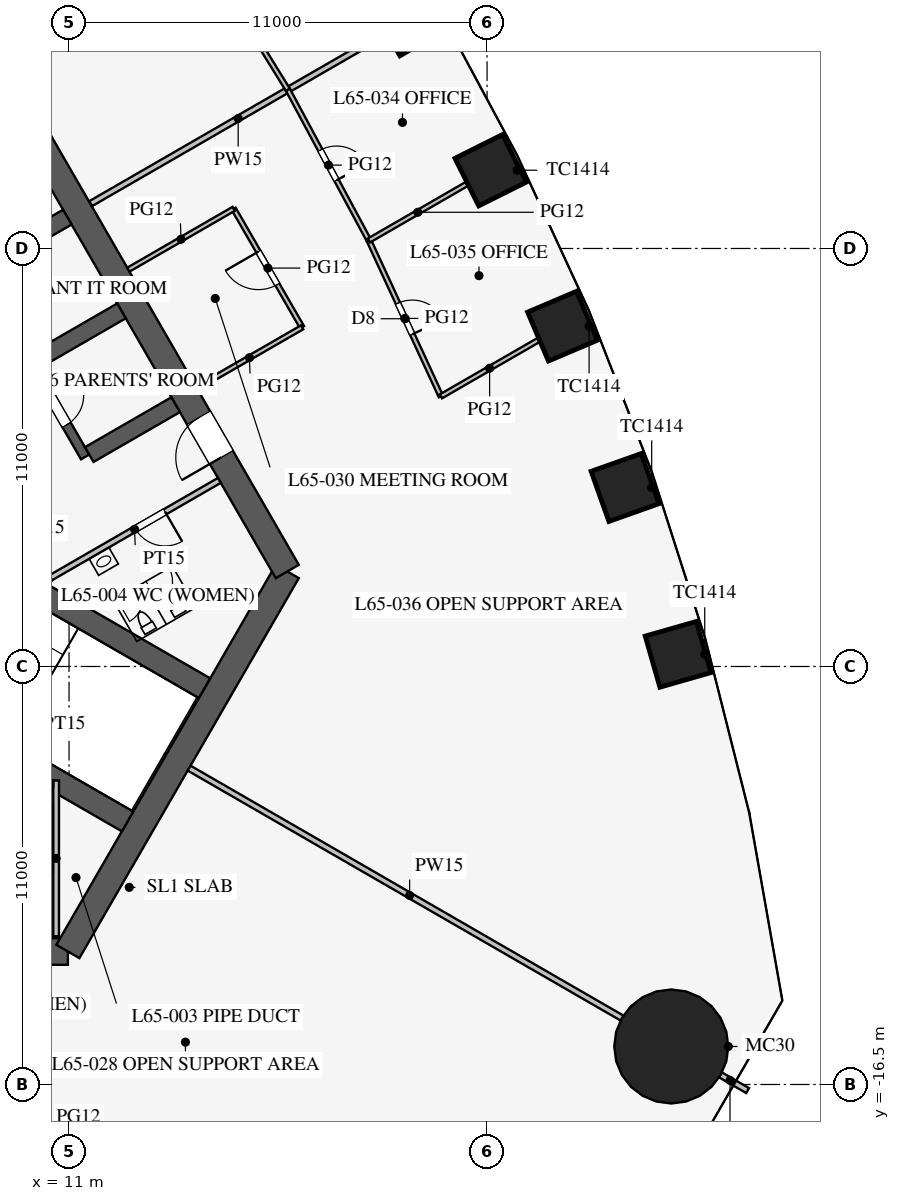
"""IFC4 building model, lengths in metres.
Left out: names, types, materials, properties, quantities, classifications, styles, units other than length and angle.
Written with IfcOpenShell. Run it as: python <this file> out.ifc"""

import sys

from ifc_helpers import new_model, si_unit, direction, frame, frame_2d, origin, origin_2d, place, context, subcontext, project, spatial, rectangle, circle, extrude, element, fill, save


model = new_model("IFC4")
c1 = context("Model", 3, precision=1e-05, world=origin(), true_north=direction((0.0, 1.0)))
c2 = subcontext(c1, "Body", "Model", "MODEL_VIEW")
j1 = project(units=[si_unit("LENGTHUNIT", "METRE"), si_unit("PLANEANGLEUNIT", "RADIAN")], contexts=[c1])
p1 = place(None, origin())
s1 = spatial("IfcSite", under=j1, at=p1, CompositionType="ELEMENT")
p2 = place(p1, origin())
s2 = spatial("IfcBuilding", under=s1, at=p2, CompositionType="ELEMENT")
p3 = place(p2, frame((0.0, 0.0, 284.7)))
s3 = spatial("IfcBuildingStorey", under=s2, at=p3, CompositionType="ELEMENT", Elevation=284.7)
for number, where, z_axis, x_axis in (
    (1, (27.027, -5.18, 0.0), (0.0, 0.0, 1.0), (-0.275, 0.961, 0.0)),
    (2, (25.632, -0.79, 0.0), (0.0, 0.0, 1.0), (-0.334, 0.942, 0.0)),
    (3, (23.985, 3.455, 0.0), (0.0, 0.0, 1.0), (-0.391, 0.92, 0.0)),
    (4, (22.094, 7.56, 0.0), (0.0, 0.0, 1.0), (-0.447, 0.895, 0.0)),
    (5, (19.963, 11.526, 0.0), (0.0, 0.0, 1.0), (-0.5, 0.866, 0.0)),
):
    element("IfcColumn", number, at=place(p3, frame(where, z_axis=z_axis, x_axis=x_axis)), inside=s3, PredefinedType="COLUMN", context=c2, shape_type="SweptSolid", body=[
        extrude(rectangle(XDim=1.4, YDim=1.4, at=origin_2d()), origin(), (0.0, 0.0, 1.0), 4.2),
    ])
p4 = place(p3, frame((26.847, -15.5, 0.0), z_axis=(0.0, 0.0, 1.0), x_axis=(1.0, 0.0, 0.0)))
e6 = element("IfcColumn", 6, at=p4, inside=s3, PredefinedType="COLUMN", context=c2, shape_type="SweptSolid", body=[
    extrude(circle(Radius=1.5, at=origin_2d()), origin(), (0.0, 0.0, 1.0), 4.2),
])
p5 = place(p3, frame((-10.97, -13.0, 0.0), z_axis=(0.0, 0.0, 1.0), x_axis=(1.0, 0.0, 0.0)))
e7 = element("IfcWall", 7, at=p5, inside=s3, PredefinedType="SHEAR", context=c2, shape_type="SweptSolid", body=[
    extrude(rectangle(XDim=21.939, YDim=0.7, at=frame_2d((10.97, 0.0))), origin(), (0.0, 0.0, 1.0), 4.2),
])
p6 = place(p5, frame((17.27, 0.0, 0.0)))
e8 = element("IfcOpeningElement", 8, at=p6, cuts=e7, PredefinedType="OPENING", context=c2, shape_type="SweptSolid", body=[
    extrude(rectangle(XDim=1.2, YDim=2.1, at=frame_2d((0.6, 1.05))), frame((0.0, 0.36, 0.0), z_axis=(0.0, -1.0, 0.0), x_axis=(1.0, 0.0, 0.0)), (0.0, 0.0, 1.0), 0.72),
])
p7 = place(p5, frame((3.47, 0.0, 0.0)))
e9 = element("IfcOpeningElement", 9, at=p7, cuts=e7, PredefinedType="OPENING", context=c2, shape_type="SweptSolid", body=[
    extrude(rectangle(XDim=1.2, YDim=2.1, at=frame_2d((0.6, 1.05))), frame((0.0, 0.36, 0.0), z_axis=(0.0, -1.0, 0.0), x_axis=(1.0, 0.0, 0.0)), (0.0, 0.0, 1.0), 0.72),
])
p8 = place(p3, frame((10.97, -13.0, 0.0), z_axis=(0.0, 0.0, 1.0), x_axis=(0.499995765644, 0.866027848477, 0.0)))
e10 = element("IfcWall", 10, at=p8, inside=s3, PredefinedType="SHEAR", context=c2, shape_type="SweptSolid", body=[
    extrude(rectangle(XDim=11.547, YDim=0.7, at=frame_2d((5.773, 0.0))), origin(), (0.0, 0.0, 1.0), 4.2),
])
p9 = place(p3, frame((16.743, -3.0, 0.0), z_axis=(0.0, 0.0, 1.0), x_axis=(-0.500002442456, 0.866023993627, 0.0)))
e11 = element("IfcWall", 11, at=p9, inside=s3, PredefinedType="SHEAR", context=c2, shape_type="SweptSolid", body=[
    extrude(rectangle(XDim=21.939, YDim=0.7, at=frame_2d((10.97, 0.0))), origin(), (0.0, 0.0, 1.0), 4.2),
])
p10 = place(p9, frame((17.27, 0.0, 0.0)))
e12 = element("IfcOpeningElement", 12, at=p10, cuts=e11, PredefinedType="OPENING", context=c2, shape_type="SweptSolid", body=[
    extrude(rectangle(XDim=1.2, YDim=2.1, at=frame_2d((0.6, 1.05))), frame((0.0, 0.36, 0.0), z_axis=(0.0, -1.0, 0.0), x_axis=(1.0, 0.0, 0.0)), (0.0, 0.0, 1.0), 0.72),
])
p11 = place(p9, frame((3.47, 0.0, 0.0)))
e13 = element("IfcOpeningElement", 13, at=p11, cuts=e11, PredefinedType="OPENING", context=c2, shape_type="SweptSolid", body=[
    extrude(rectangle(XDim=1.2, YDim=2.1, at=frame_2d((0.6, 1.05))), frame((0.0, 0.36, 0.0), z_axis=(0.0, -1.0, 0.0), x_axis=(1.0, 0.0, 0.0)), (0.0, 0.0, 1.0), 0.72),
])
p12 = place(p3, frame((11.424, 0.014, 0.0), z_axis=(0.0, 0.0, 1.0), x_axis=(-0.500001763848, 0.866024385424, 0.0)))
e14 = element("IfcWall", 14, at=p12, inside=s3, PredefinedType="SHEAR", context=c2, shape_type="SweptSolid", body=[
    extrude(rectangle(XDim=11.4, YDim=0.25, at=frame_2d((5.7, 0.0))), origin(), (0.0, 0.0, 1.0), 4.2),
])
p13 = place(p12, frame((0.975, 0.0, 0.0)))
e15 = element("IfcOpeningElement", 15, at=p13, cuts=e14, PredefinedType="OPENING", context=c2, shape_type="SweptSolid", body=[
    extrude(rectangle(XDim=0.9, YDim=2.1, at=frame_2d((0.45, 1.05))), frame((0.0, 0.135, 0.0), z_axis=(0.0, -1.0, 0.0), x_axis=(1.0, 0.0, 0.0)), (0.0, 0.0, 1.0), 0.27),
])
p14 = place(p12, frame((3.825, 0.0, 0.0)))
e16 = element("IfcOpeningElement", 16, at=p14, cuts=e14, PredefinedType="OPENING", context=c2, shape_type="SweptSolid", body=[
    extrude(rectangle(XDim=0.9, YDim=2.1, at=frame_2d((0.45, 1.05))), frame((0.0, 0.135, 0.0), z_axis=(0.0, -1.0, 0.0), x_axis=(1.0, 0.0, 0.0)), (0.0, 0.0, 1.0), 0.27),
])
p15 = place(p12, frame((6.675, 0.0, 0.0)))
e17 = element("IfcOpeningElement", 17, at=p15, cuts=e14, PredefinedType="OPENING", context=c2, shape_type="SweptSolid", body=[
    extrude(rectangle(XDim=0.9, YDim=2.1, at=frame_2d((0.45, 1.05))), frame((0.0, 0.135, 0.0), z_axis=(0.0, -1.0, 0.0), x_axis=(1.0, 0.0, 0.0)), (0.0, 0.0, 1.0), 0.27),
])
p16 = place(p12, frame((9.525, 0.0, 0.0)))
e18 = element("IfcOpeningElement", 18, at=p16, cuts=e14, PredefinedType="OPENING", context=c2, shape_type="SweptSolid", body=[
    extrude(rectangle(XDim=0.9, YDim=2.1, at=frame_2d((0.45, 1.05))), frame((0.0, 0.135, 0.0), z_axis=(0.0, -1.0, 0.0), x_axis=(1.0, 0.0, 0.0)), (0.0, 0.0, 1.0), 0.27),
])
for number, where, z_axis, x_axis in (
    (19, (11.532, 0.076, 0.0), (0.0, 0.0, 1.0), (0.866, 0.5, 0.0)),
    (20, (10.107, 2.544, 0.0), (0.0, 0.0, 1.0), (0.866, 0.5, 0.0)),
    (21, (8.682, 5.012, 0.0), (0.0, 0.0, 1.0), (0.866, 0.5, 0.0)),
):
    element("IfcWall", number, at=place(p3, frame(where, z_axis=z_axis, x_axis=x_axis)), inside=s3, PredefinedType="SHEAR", context=c2, shape_type="SweptSolid", body=[
        extrude(rectangle(XDim=2.625, YDim=0.45, at=frame_2d((1.312, 0.0))), origin(), (0.0, 0.0, 1.0), 4.2),
    ])
for number, where, z_axis, x_axis in (
    (22, (4.638, -5.016, 0.0), (0.0, 0.0, 1.0), (0.866, -0.5, 0.0)),
    (23, (6.663, -1.509, 0.0), (0.0, 0.0, 1.0), (0.866, -0.5, 0.0)),
):
    element("IfcWall", number, at=place(p3, frame(where, z_axis=z_axis, x_axis=x_axis)), inside=s3, PredefinedType="SHEAR", context=c2, shape_type="SweptSolid", body=[
        extrude(rectangle(XDim=9.125, YDim=0.6, at=frame_2d((4.562, 0.0))), origin(), (0.0, 0.0, 1.0), 4.2),
    ])
p17 = place(p3, frame((10.495, -3.178, 0.0), z_axis=(0.0, 0.0, 1.0), x_axis=(0.866037967349, 0.499978238636, 0.0)))
e24 = element("IfcWall", 24, at=p17, inside=s3, PredefinedType="PARTITIONING", context=c2, shape_type="SweptSolid", body=[
    extrude(rectangle(XDim=5.15, YDim=0.15, at=frame_2d((2.575, 0.0))), origin(), (0.0, 0.0, 1.0), 4.0),
])
p18 = place(p17, frame((2.6, 0.0, 0.0)))
e25 = element("IfcOpeningElement", 25, at=p18, cuts=e24, PredefinedType="OPENING", context=c2, shape_type="SweptSolid", body=[
    extrude(rectangle(XDim=0.9, YDim=2.1, at=frame_2d((0.45, 1.05))), frame((0.0, 0.085, 0.0), z_axis=(0.0, -1.0, 0.0), x_axis=(1.0, 0.0, 0.0)), (0.0, 0.0, 1.0), 0.17),
])
p19 = place(p3, frame((10.66, -8.5, 0.0), z_axis=(0.0, 0.0, 1.0), x_axis=(0.0, -1.0, 0.0)))
e26 = element("IfcWall", 26, at=p19, inside=s3, PredefinedType="PARTITIONING", context=c2, shape_type="SweptSolid", body=[
    extrude(rectangle(XDim=4.1, YDim=0.15, at=frame_2d((2.05, 0.0))), origin(), (0.0, 0.0, 1.0), 4.0),
])
p20 = place(p3, frame((8.075, -8.575, 0.0), z_axis=(0.0, 0.0, 1.0), x_axis=(1.0, 0.0, 0.0)))
e27 = element("IfcWall", 27, at=p20, inside=s3, PredefinedType="PARTITIONING", context=c2, shape_type="SweptSolid", body=[
    extrude(rectangle(XDim=2.51, YDim=0.15, at=frame_2d((1.255, 0.0))), origin(), (0.0, 0.0, 1.0), 4.0),
])
p21 = place(p3, frame((14.159, -8.175, 0.0), z_axis=(0.0, 0.0, 1.0), x_axis=(0.866026905467, -0.499997399001, 0.0)))
e28 = element("IfcWall", 28, at=p21, inside=s3, PredefinedType="PARTITIONING", context=c2, shape_type="SweptSolid", body=[
    extrude(rectangle(XDim=13.4, YDim=0.15, at=frame_2d((6.7, 0.0))), origin(), (0.0, 0.0, 1.0), 2.5),
])
p22 = place(p3, frame((27.929, -16.125, 0.0), z_axis=(0.0, 0.0, 1.0), x_axis=(0.866086810508, -0.499893625349, 0.0)))
e29 = element("IfcWall", 29, at=p22, inside=s3, PredefinedType="PARTITIONING", context=c2, shape_type="SweptSolid", body=[
    extrude(rectangle(XDim=1.07, YDim=0.15, at=frame_2d((0.535, 0.0))), origin(), (0.0, 0.0, 1.0), 2.5),
])
p23 = place(p3, frame((11.57, 6.68, 0.0), z_axis=(0.0, 0.0, 1.0), x_axis=(0.866018180823, 0.500012510328, 0.0)))
e30 = element("IfcWall", 30, at=p23, inside=s3, PredefinedType="PARTITIONING", context=c2, shape_type="SweptSolid", body=[
    extrude(rectangle(XDim=8.962, YDim=0.15, at=frame_2d((4.481, 0.0))), origin(), (0.0, 0.0, 1.0), 3.0),
])
p24 = place(p3, frame((17.133, 3.425, 0.0), z_axis=(0.0, 0.0, 1.0), x_axis=(-0.500012057535, 0.866018442252, 0.0)))
e31 = element("IfcWall", 31, at=p24, inside=s3, PredefinedType="PARTITIONING", context=c2, shape_type="SweptSolid", body=[
    extrude(rectangle(XDim=3.6, YDim=0.12, at=frame_2d((1.8, 0.0))), origin(), (0.0, 0.0, 1.0), 2.9),
])
p25 = place(p24, frame((1.3, 0.0, 0.15)))
e32 = element("IfcOpeningElement", 32, at=p25, cuts=e31, PredefinedType="OPENING", context=c2, shape_type="SweptSolid", body=[
    extrude(rectangle(XDim=1.0, YDim=2.1, at=frame_2d((0.5, 1.05))), frame((0.0, 0.07, 0.0), z_axis=(0.0, -1.0, 0.0), x_axis=(1.0, 0.0, 0.0)), (0.0, 0.0, 1.0), 0.14),
])
p26 = place(p3, frame((12.562, 4.943, 0.0), z_axis=(0.0, 0.0, 1.0), x_axis=(0.866008981251, 0.500028443584, 0.0)))
e33 = element("IfcWall", 33, at=p26, inside=s3, PredefinedType="PARTITIONING", context=c2, shape_type="SweptSolid", body=[
    extrude(rectangle(XDim=3.2, YDim=0.12, at=frame_2d((1.6, 0.0))), origin(), (0.0, 0.0, 1.0), 2.9),
])
p27 = place(p3, frame((14.361, 1.825, 0.0), z_axis=(0.0, 0.0, 1.0), x_axis=(0.866028054938, 0.499995408039, 0.0)))
e34 = element("IfcWall", 34, at=p27, inside=s3, PredefinedType="PARTITIONING", context=c2, shape_type="SweptSolid", body=[
    extrude(rectangle(XDim=3.2, YDim=0.12, at=frame_2d((1.6, 0.0))), origin(), (0.0, 0.0, 1.0), 2.9),
])
p28 = place(p3, frame((16.759, 9.676, 0.0), z_axis=(0.0, 0.0, 1.0), x_axis=(-0.525996140194, 0.850486954927, 0.0)))
e35 = element("IfcWall", 35, at=p28, inside=s3, PredefinedType="PARTITIONING", context=c2, shape_type="SweptSolid", body=[
    extrude(rectangle(XDim=4.502, YDim=0.12, at=frame_2d((2.251, 0.0))), origin(), (0.0, 0.0, 1.0), 2.9),
])
p29 = place(p28, frame((1.8, 0.0, 0.15)))
e36 = element("IfcOpeningElement", 36, at=p29, cuts=e35, PredefinedType="OPENING", context=c2, shape_type="SweptSolid", body=[
    extrude(rectangle(XDim=0.9, YDim=2.1, at=frame_2d((0.45, 1.05))), frame((0.0, 0.07, 0.0), z_axis=(0.0, -1.0, 0.0), x_axis=(1.0, 0.0, 0.0)), (0.0, 0.0, 1.0), 0.14),
])
p30 = place(p3, frame((18.891, 5.71, 0.0), z_axis=(0.0, 0.0, 1.0), x_axis=(-0.473524102582, 0.880780860529, 0.0)))
e37 = element("IfcWall", 37, at=p30, inside=s3, PredefinedType="PARTITIONING", context=c2, shape_type="SweptSolid", body=[
    extrude(rectangle(XDim=4.502, YDim=0.12, at=frame_2d((2.251, 0.0))), origin(), (0.0, 0.0, 1.0), 2.9),
])
p31 = place(p30, frame((1.8, 0.0, 0.15)))
e38 = element("IfcOpeningElement", 38, at=p31, cuts=e37, PredefinedType="OPENING", context=c2, shape_type="SweptSolid", body=[
    extrude(rectangle(XDim=0.9, YDim=2.1, at=frame_2d((0.45, 1.05))), frame((0.0, 0.07, 0.0), z_axis=(0.0, -1.0, 0.0), x_axis=(1.0, 0.0, 0.0)), (0.0, 0.0, 1.0), 0.14),
])
p32 = place(p3, frame((20.786, 1.608, 0.0), z_axis=(0.0, 0.0, 1.0), x_axis=(-0.419335693458, 0.907831248742, 0.0)))
e39 = element("IfcWall", 39, at=p32, inside=s3, PredefinedType="PARTITIONING", context=c2, shape_type="SweptSolid", body=[
    extrude(rectangle(XDim=4.519, YDim=0.12, at=frame_2d((2.259, 0.0))), origin(), (0.0, 0.0, 1.0), 2.9),
])
p33 = place(p32, frame((1.8, 0.0, 0.15)))
e40 = element("IfcOpeningElement", 40, at=p33, cuts=e39, PredefinedType="OPENING", context=c2, shape_type="SweptSolid", body=[
    extrude(rectangle(XDim=0.9, YDim=2.1, at=frame_2d((0.45, 1.05))), frame((0.0, 0.07, 0.0), z_axis=(0.0, -1.0, 0.0), x_axis=(1.0, 0.0, 0.0)), (0.0, 0.0, 1.0), 0.14),
])
p34 = place(p3, frame((18.891, 5.71, 0.0), z_axis=(0.0, 0.0, 1.0), x_axis=(0.866032134716, 0.499988341504, 0.0)))
e41 = element("IfcWall", 41, at=p34, inside=s3, PredefinedType="PARTITIONING", context=c2, shape_type="SweptSolid", body=[
    extrude(rectangle(XDim=2.967, YDim=0.12, at=frame_2d((1.484, 0.0))), origin(), (0.0, 0.0, 1.0), 2.9),
])
p35 = place(p3, frame((20.786, 1.608, 0.0), z_axis=(0.0, 0.0, 1.0), x_axis=(0.866056430242, 0.499946256749, 0.0)))
e42 = element("IfcWall", 42, at=p35, inside=s3, PredefinedType="PARTITIONING", context=c2, shape_type="SweptSolid", body=[
    extrude(rectangle(XDim=2.959, YDim=0.12, at=frame_2d((1.479, 0.0))), origin(), (0.0, 0.0, 1.0), 2.9),
])
p36 = place(p18, frame((0.9, 0.0, 0.0), z_axis=(0.0, 0.0, 1.0), x_axis=(-1.0, 0.0, 0.0)))
e43 = element("IfcDoor", 43, at=p36, inside=s3, OperationType="SINGLE_SWING_LEFT", PredefinedType="DOOR", context=c2, shape_type="SweptSolid", body=[
    extrude(rectangle(XDim=0.9, YDim=2.1, at=frame_2d((0.45, 1.05))), frame((0.0, 0.025, 0.0), z_axis=(0.0, -1.0, 0.0), x_axis=(1.0, 0.0, 0.0)), (0.0, 0.0, 1.0), 0.05),
])
fill(e25, e43)
p37 = place(p11, origin())
e44 = element("IfcDoor", 44, at=p37, inside=s3, OperationType="SINGLE_SWING_LEFT", PredefinedType="DOOR", context=c2, shape_type="SweptSolid", body=[
    extrude(rectangle(XDim=1.2, YDim=2.1, at=frame_2d((0.6, 1.05))), frame((0.0, 0.025, 0.0), z_axis=(0.0, -1.0, 0.0), x_axis=(1.0, 0.0, 0.0)), (0.0, 0.0, 1.0), 0.05),
])
fill(e13, e44)
p38 = place(p13, frame((0.9, 0.0, 0.0), z_axis=(0.0, 0.0, 1.0), x_axis=(-1.0, 0.0, 0.0)))
e45 = element("IfcDoor", 45, at=p38, inside=s3, OperationType="SINGLE_SWING_LEFT", PredefinedType="DOOR", context=c2, shape_type="SweptSolid", body=[
    extrude(rectangle(XDim=0.9, YDim=2.1, at=frame_2d((0.45, 1.05))), frame((0.0, 0.025, 0.0), z_axis=(0.0, -1.0, 0.0), x_axis=(1.0, 0.0, 0.0)), (0.0, 0.0, 1.0), 0.05),
])
fill(e15, e45)
p39 = place(p25, origin())
e46 = element("IfcDoor", 46, at=p39, inside=s3, OperationType="SINGLE_SWING_RIGHT", PredefinedType="DOOR", context=c2, shape_type="SweptSolid", body=[
    extrude(rectangle(XDim=1.0, YDim=2.1, at=frame_2d((0.5, 1.05))), frame((0.0, 0.025, 0.0), z_axis=(0.0, -1.0, 0.0), x_axis=(1.0, 0.0, 0.0)), (0.0, 0.0, 1.0), 0.05),
])
fill(e32, e46)
p40 = place(p31, frame((0.9, 0.0, 0.0), z_axis=(0.0, 0.0, 1.0), x_axis=(-1.0, 0.0, 0.0)))
e47 = element("IfcDoor", 47, at=p40, inside=s3, OperationType="SINGLE_SWING_RIGHT", PredefinedType="DOOR", context=c2, shape_type="SweptSolid", body=[
    extrude(rectangle(XDim=0.9, YDim=2.1, at=frame_2d((0.45, 1.05))), frame((0.0, 0.025, 0.0), z_axis=(0.0, -1.0, 0.0), x_axis=(1.0, 0.0, 0.0)), (0.0, 0.0, 1.0), 0.05),
])
fill(e38, e47)
p41 = place(p33, frame((0.9, 0.0, 0.0), z_axis=(0.0, 0.0, 1.0), x_axis=(-1.0, 0.0, 0.0)))
e48 = element("IfcDoor", 48, at=p41, inside=s3, OperationType="SINGLE_SWING_RIGHT", PredefinedType="DOOR", context=c2, shape_type="SweptSolid", body=[
    extrude(rectangle(XDim=0.9, YDim=2.1, at=frame_2d((0.45, 1.05))), frame((0.0, 0.025, 0.0), z_axis=(0.0, -1.0, 0.0), x_axis=(1.0, 0.0, 0.0)), (0.0, 0.0, 1.0), 0.05),
])
fill(e40, e48)
save(model, sys.argv[1])
